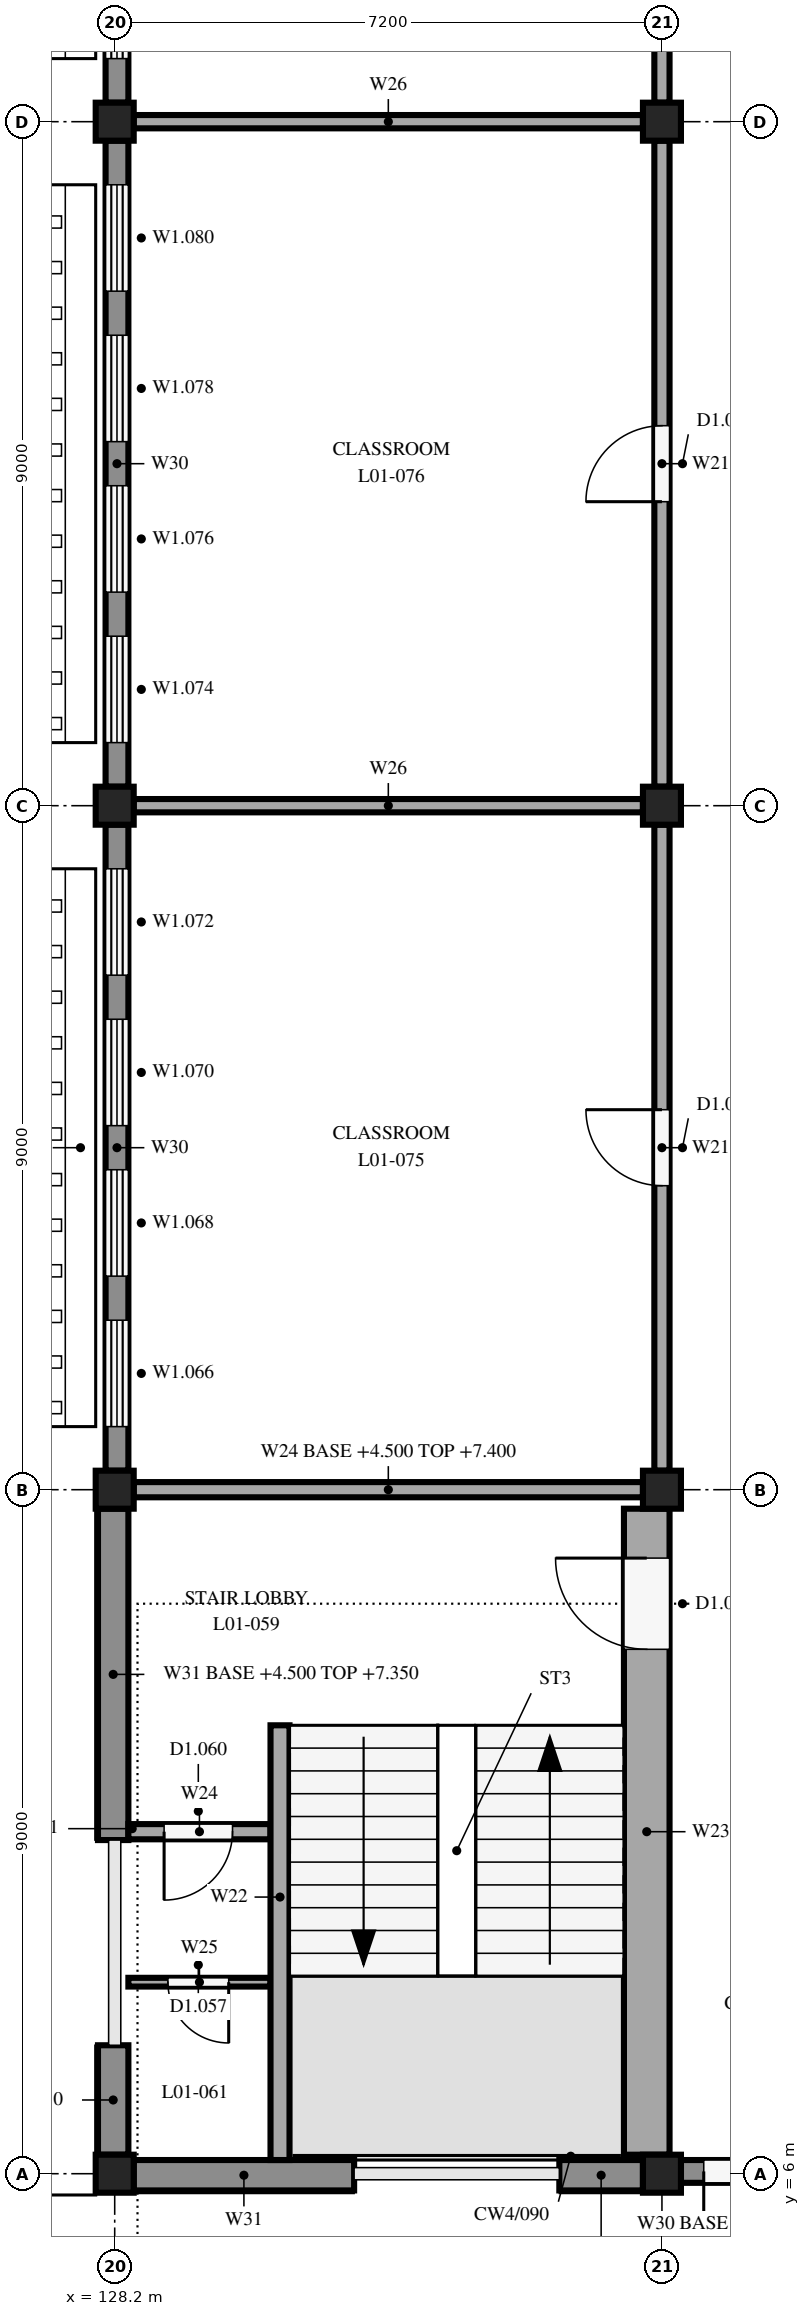
"""IFC4 building model, lengths in metres.
Left out: names, types, materials, properties, quantities, classifications, styles, units other than length and angle.
Written with IfcOpenShell. Run it as: python <this file> out.ifc"""

import sys

from ifc_helpers import new_model, si_unit, direction, frame, frame_2d, origin, origin_2d, place, context, subcontext, project, spatial, rectangle, extrude, element, fill, save


model = new_model("IFC4")
c1 = context("Model", 3, precision=1e-05, world=origin(), true_north=direction((0.0, 1.0)))
c2 = subcontext(c1, "Body", "Model", "MODEL_VIEW")
j1 = project(units=[si_unit("LENGTHUNIT", "METRE"), si_unit("PLANEANGLEUNIT", "RADIAN")], contexts=[c1])
p1 = place(None, origin())
s1 = spatial("IfcSite", under=j1, at=p1, CompositionType="ELEMENT")
p2 = place(p1, origin())
s2 = spatial("IfcBuilding", under=s1, at=p2, CompositionType="ELEMENT")
p3 = place(p2, frame((0.0, 0.0, 4.5)))
s3 = spatial("IfcBuildingStorey", under=s2, at=p3, CompositionType="ELEMENT", Elevation=4.5)
for number, where, z_axis, x_axis in (
    (1, (128.2, 6.0, 0.0), (0.0, 0.0, 1.0), (1.0, 0.0, 0.0)),
    (2, (128.2, 15.0, 0.0), (0.0, 0.0, 1.0), (1.0, 0.0, 0.0)),
    (3, (128.2, 24.0, 0.0), (0.0, 0.0, 1.0), (1.0, 0.0, 0.0)),
    (4, (128.2, 33.0, 0.0), (0.0, 0.0, 1.0), (1.0, 0.0, 0.0)),
    (5, (135.4, 6.0, 0.0), (0.0, 0.0, 1.0), (1.0, 0.0, 0.0)),
    (6, (135.4, 15.0, 0.0), (0.0, 0.0, 1.0), (1.0, 0.0, 0.0)),
    (7, (135.4, 24.0, 0.0), (0.0, 0.0, 1.0), (1.0, 0.0, 0.0)),
    (8, (135.4, 33.0, 0.0), (0.0, 0.0, 1.0), (1.0, 0.0, 0.0)),
):
    element("IfcColumn", number, at=place(p3, frame(where, z_axis=z_axis, x_axis=x_axis)), inside=s3, PredefinedType="COLUMN", context=c2, shape_type="SweptSolid", body=[
        extrude(rectangle(XDim=0.5, YDim=0.5, at=origin_2d()), origin(), (0.0, 0.0, 1.0), 3.35),
    ])
p4 = place(p3, frame((128.18, 6.25, 0.0), z_axis=(0.0, 0.0, 1.0), x_axis=(0.0, 1.0, 0.0)))
e9 = element("IfcWall", 9, at=p4, inside=s3, PredefinedType="STANDARD", context=c2, shape_type="SweptSolid", body=[
    extrude(rectangle(XDim=1.44, YDim=0.4, at=frame_2d((0.72, 0.0))), origin(), (0.0, 0.0, 1.0), 2.85),
])
p5 = place(p3, frame((128.18, 10.39, 0.0), z_axis=(0.0, 0.0, 1.0), x_axis=(0.0, 1.0, 0.0)))
e10 = element("IfcWall", 10, at=p5, inside=s3, PredefinedType="STANDARD", context=c2, shape_type="SweptSolid", body=[
    extrude(rectangle(XDim=4.36, YDim=0.4, at=frame_2d((2.18, 0.0))), origin(), (0.0, 0.0, 1.0), 2.85),
])
p6 = place(p3, frame((128.23, 15.25, 0.0), z_axis=(0.0, 0.0, 1.0), x_axis=(0.0, 1.0, 0.0)))
e11 = element("IfcWall", 11, at=p6, inside=s3, PredefinedType="STANDARD", context=c2, shape_type="SweptSolid", body=[
    extrude(rectangle(XDim=8.5, YDim=0.3, at=frame_2d((4.25, 0.0))), origin(), (0.0, 0.0, 1.0), 2.85),
])
p7 = place(p6, frame((0.58, 0.0, 0.6)))
e12 = element("IfcOpeningElement", 12, at=p7, cuts=e11, PredefinedType="OPENING", context=c2, shape_type="SweptSolid", body=[
    extrude(rectangle(XDim=1.4, YDim=2.2, at=frame_2d((0.7, 1.1))), frame((0.0, 0.16, 0.0), z_axis=(0.0, -1.0, 0.0), x_axis=(1.0, 0.0, 0.0)), (0.0, 0.0, 1.0), 0.32),
])
p8 = place(p6, frame((2.56, 0.0, 0.6)))
e13 = element("IfcOpeningElement", 13, at=p8, cuts=e11, PredefinedType="OPENING", context=c2, shape_type="SweptSolid", body=[
    extrude(rectangle(XDim=1.4, YDim=2.2, at=frame_2d((0.7, 1.1))), frame((0.0, 0.16, 0.0), z_axis=(0.0, -1.0, 0.0), x_axis=(1.0, 0.0, 0.0)), (0.0, 0.0, 1.0), 0.32),
])
p9 = place(p6, frame((4.54, 0.0, 0.6)))
e14 = element("IfcOpeningElement", 14, at=p9, cuts=e11, PredefinedType="OPENING", context=c2, shape_type="SweptSolid", body=[
    extrude(rectangle(XDim=1.4, YDim=2.2, at=frame_2d((0.7, 1.1))), frame((0.0, 0.16, 0.0), z_axis=(0.0, -1.0, 0.0), x_axis=(1.0, 0.0, 0.0)), (0.0, 0.0, 1.0), 0.32),
])
p10 = place(p6, frame((6.52, 0.0, 0.6)))
e15 = element("IfcOpeningElement", 15, at=p10, cuts=e11, PredefinedType="OPENING", context=c2, shape_type="SweptSolid", body=[
    extrude(rectangle(XDim=1.4, YDim=2.2, at=frame_2d((0.7, 1.1))), frame((0.0, 0.16, 0.0), z_axis=(0.0, -1.0, 0.0), x_axis=(1.0, 0.0, 0.0)), (0.0, 0.0, 1.0), 0.32),
])
p11 = place(p3, frame((128.23, 24.25, 0.0), z_axis=(0.0, 0.0, 1.0), x_axis=(0.0, 1.0, 0.0)))
e16 = element("IfcWall", 16, at=p11, inside=s3, PredefinedType="STANDARD", context=c2, shape_type="SweptSolid", body=[
    extrude(rectangle(XDim=8.5, YDim=0.3, at=frame_2d((4.25, 0.0))), origin(), (0.0, 0.0, 1.0), 2.85),
])
p12 = place(p11, frame((0.58, 0.0, 0.6)))
e17 = element("IfcOpeningElement", 17, at=p12, cuts=e16, PredefinedType="OPENING", context=c2, shape_type="SweptSolid", body=[
    extrude(rectangle(XDim=1.4, YDim=2.2, at=frame_2d((0.7, 1.1))), frame((0.0, 0.16, 0.0), z_axis=(0.0, -1.0, 0.0), x_axis=(1.0, 0.0, 0.0)), (0.0, 0.0, 1.0), 0.32),
])
p13 = place(p11, frame((2.56, 0.0, 0.6)))
e18 = element("IfcOpeningElement", 18, at=p13, cuts=e16, PredefinedType="OPENING", context=c2, shape_type="SweptSolid", body=[
    extrude(rectangle(XDim=1.4, YDim=2.2, at=frame_2d((0.7, 1.1))), frame((0.0, 0.16, 0.0), z_axis=(0.0, -1.0, 0.0), x_axis=(1.0, 0.0, 0.0)), (0.0, 0.0, 1.0), 0.32),
])
p14 = place(p11, frame((4.54, 0.0, 0.6)))
e19 = element("IfcOpeningElement", 19, at=p14, cuts=e16, PredefinedType="OPENING", context=c2, shape_type="SweptSolid", body=[
    extrude(rectangle(XDim=1.4, YDim=2.2, at=frame_2d((0.7, 1.1))), frame((0.0, 0.16, 0.0), z_axis=(0.0, -1.0, 0.0), x_axis=(1.0, 0.0, 0.0)), (0.0, 0.0, 1.0), 0.32),
])
p15 = place(p11, frame((6.52, 0.0, 0.6)))
e20 = element("IfcOpeningElement", 20, at=p15, cuts=e16, PredefinedType="OPENING", context=c2, shape_type="SweptSolid", body=[
    extrude(rectangle(XDim=1.4, YDim=2.2, at=frame_2d((0.7, 1.1))), frame((0.0, 0.16, 0.0), z_axis=(0.0, -1.0, 0.0), x_axis=(1.0, 0.0, 0.0)), (0.0, 0.0, 1.0), 0.32),
])
p16 = place(p3, frame((128.23, 33.25, 0.0), z_axis=(0.0, 0.0, 1.0), x_axis=(0.0, 1.0, 0.0)))
e21 = element("IfcWall", 21, at=p16, inside=s3, PredefinedType="STANDARD", context=c2, shape_type="SweptSolid", body=[
    extrude(rectangle(XDim=8.5, YDim=0.3, at=frame_2d((4.25, 0.0))), origin(), (0.0, 0.0, 1.0), 2.85),
])
p17 = place(p16, frame((0.58, 0.0, 0.6)))
e22 = element("IfcOpeningElement", 22, at=p17, cuts=e21, PredefinedType="OPENING", context=c2, shape_type="SweptSolid", body=[
    extrude(rectangle(XDim=1.4, YDim=2.2, at=frame_2d((0.7, 1.1))), frame((0.0, 0.16, 0.0), z_axis=(0.0, -1.0, 0.0), x_axis=(1.0, 0.0, 0.0)), (0.0, 0.0, 1.0), 0.32),
])
p18 = place(p16, frame((2.56, 0.0, 0.6)))
e23 = element("IfcOpeningElement", 23, at=p18, cuts=e21, PredefinedType="OPENING", context=c2, shape_type="SweptSolid", body=[
    extrude(rectangle(XDim=1.4, YDim=2.2, at=frame_2d((0.7, 1.1))), frame((0.0, 0.16, 0.0), z_axis=(0.0, -1.0, 0.0), x_axis=(1.0, 0.0, 0.0)), (0.0, 0.0, 1.0), 0.32),
])
p19 = place(p16, frame((4.54, 0.0, 0.6)))
e24 = element("IfcOpeningElement", 24, at=p19, cuts=e21, PredefinedType="OPENING", context=c2, shape_type="SweptSolid", body=[
    extrude(rectangle(XDim=1.4, YDim=2.2, at=frame_2d((0.7, 1.1))), frame((0.0, 0.16, 0.0), z_axis=(0.0, -1.0, 0.0), x_axis=(1.0, 0.0, 0.0)), (0.0, 0.0, 1.0), 0.32),
])
p20 = place(p16, frame((6.52, 0.0, 0.6)))
e25 = element("IfcOpeningElement", 25, at=p20, cuts=e21, PredefinedType="OPENING", context=c2, shape_type="SweptSolid", body=[
    extrude(rectangle(XDim=1.4, YDim=2.2, at=frame_2d((0.7, 1.1))), frame((0.0, 0.16, 0.0), z_axis=(0.0, -1.0, 0.0), x_axis=(1.0, 0.0, 0.0)), (0.0, 0.0, 1.0), 0.32),
])
p21 = place(p3, frame((131.35, 5.98, 0.0), z_axis=(0.0, 0.0, 1.0), x_axis=(-1.0, 0.0, 0.0)))
e26 = element("IfcWall", 26, at=p21, inside=s3, PredefinedType="STANDARD", context=c2, shape_type="SweptSolid", body=[
    extrude(rectangle(XDim=2.9, YDim=0.4, at=frame_2d((1.45, 0.0))), origin(), (0.0, 0.0, 1.0), 2.9),
])
p22 = place(p3, frame((135.15, 5.98, 0.0), z_axis=(0.0, 0.0, 1.0), x_axis=(-1.0, 0.0, 0.0)))
e27 = element("IfcWall", 27, at=p22, inside=s3, PredefinedType="STANDARD", context=c2, shape_type="SweptSolid", body=[
    extrude(rectangle(XDim=1.1, YDim=0.4, at=frame_2d((0.55, 0.0))), origin(), (0.0, 0.0, 1.0), 2.9),
])
p23 = place(p3, frame((137.85, 6.03, 0.0), z_axis=(0.0, 0.0, 1.0), x_axis=(-1.0, 0.0, 0.0)))
e28 = element("IfcWall", 28, at=p23, inside=s3, PredefinedType="STANDARD", context=c2, shape_type="SweptSolid", body=[
    extrude(rectangle(XDim=2.2, YDim=0.3, at=frame_2d((1.1, 0.0))), origin(), (0.0, 0.0, 1.0), 3.0),
])
p24 = place(p23, frame((0.3, 0.0, 0.0)))
e29 = element("IfcOpeningElement", 29, at=p24, cuts=e28, PredefinedType="OPENING", context=c2, shape_type="SweptSolid", body=[
    extrude(rectangle(XDim=1.6, YDim=2.4, at=frame_2d((0.8, 1.2))), frame((0.0, 0.16, 0.0), z_axis=(0.0, -1.0, 0.0), x_axis=(1.0, 0.0, 0.0)), (0.0, 0.0, 1.0), 0.32),
])
p25 = place(p3, frame((130.375, 6.18, 0.0), z_axis=(0.0, 0.0, 1.0), x_axis=(0.0, 1.0, 0.0)))
e30 = element("IfcWall", 30, at=p25, inside=s3, PredefinedType="SOLIDWALL", context=c2, shape_type="SweptSolid", body=[
    extrude(rectangle(XDim=5.72, YDim=0.25, at=frame_2d((2.86, 0.0))), origin(), (0.0, 0.0, 1.0), 3.35),
])
p26 = place(p3, frame((135.2, 6.25, 0.0), z_axis=(0.0, 0.0, 1.0), x_axis=(0.0, 1.0, 0.0)))
e31 = element("IfcWall", 31, at=p26, inside=s3, PredefinedType="SOLIDWALL", context=c2, shape_type="SweptSolid", body=[
    extrude(rectangle(XDim=8.5, YDim=0.6, at=frame_2d((4.25, 0.0))), origin(), (0.0, 0.0, 1.0), 3.35),
])
p27 = place(p26, frame((6.65, 0.0, 0.0)))
e32 = element("IfcOpeningElement", 32, at=p27, cuts=e31, PredefinedType="OPENING", context=c2, shape_type="SweptSolid", body=[
    extrude(rectangle(XDim=1.2, YDim=2.1, at=frame_2d((0.6, 1.05))), frame((0.0, 0.31, 0.0), z_axis=(0.0, -1.0, 0.0), x_axis=(1.0, 0.0, 0.0)), (0.0, 0.0, 1.0), 0.62),
])
p28 = place(p3, frame((130.25, 10.5, 0.0), z_axis=(0.0, 0.0, 1.0), x_axis=(-1.0, 0.0, 0.0)))
e33 = element("IfcWall", 33, at=p28, inside=s3, PredefinedType="SOLIDWALL", context=c2, shape_type="SweptSolid", body=[
    extrude(rectangle(XDim=1.87, YDim=0.2, at=frame_2d((0.935, 0.0))), origin(), (0.0, 0.0, 1.0), 3.35),
])
p29 = place(p28, frame((0.5, 0.0, 0.0)))
e34 = element("IfcOpeningElement", 34, at=p29, cuts=e33, PredefinedType="OPENING", context=c2, shape_type="SweptSolid", body=[
    extrude(rectangle(XDim=0.9, YDim=2.1, at=frame_2d((0.45, 1.05))), frame((0.0, 0.11, 0.0), z_axis=(0.0, -1.0, 0.0), x_axis=(1.0, 0.0, 0.0)), (0.0, 0.0, 1.0), 0.22),
])
p30 = place(p3, frame((130.25, 8.52, 0.0), z_axis=(0.0, 0.0, 1.0), x_axis=(-1.0, 0.0, 0.0)))
e35 = element("IfcWall", 35, at=p30, inside=s3, PredefinedType="PARTITIONING", context=c2, shape_type="SweptSolid", body=[
    extrude(rectangle(XDim=1.87, YDim=0.115, at=frame_2d((0.935, 0.0))), origin(), (0.0, 0.0, 1.0), 3.35),
])
p31 = place(p30, frame((0.55, 0.0, 0.0)))
e36 = element("IfcOpeningElement", 36, at=p31, cuts=e35, PredefinedType="OPENING", context=c2, shape_type="SweptSolid", body=[
    extrude(rectangle(XDim=0.8, YDim=2.1, at=frame_2d((0.4, 1.05))), frame((0.0, 0.067, 0.0), z_axis=(0.0, -1.0, 0.0), x_axis=(1.0, 0.0, 0.0)), (0.0, 0.0, 1.0), 0.135),
])
p32 = place(p3, frame((128.45, 15.0, 0.0), z_axis=(0.0, 0.0, 1.0), x_axis=(1.0, 0.0, 0.0)))
e37 = element("IfcWall", 37, at=p32, inside=s3, PredefinedType="SOLIDWALL", context=c2, shape_type="SweptSolid", body=[
    extrude(rectangle(XDim=6.7, YDim=0.2, at=frame_2d((3.35, 0.0))), origin(), (0.0, 0.0, 1.0), 2.9),
])
p33 = place(p3, frame((135.4, 15.25, 0.0), z_axis=(0.0, 0.0, 1.0), x_axis=(0.0, 1.0, 0.0)))
e38 = element("IfcWall", 38, at=p33, inside=s3, PredefinedType="PARTITIONING", context=c2, shape_type="SweptSolid", body=[
    extrude(rectangle(XDim=8.5, YDim=0.2, at=frame_2d((4.25, 0.0))), origin(), (0.0, 0.0, 1.0), 2.9),
])
p34 = place(p33, frame((3.75, 0.0, 0.0)))
e39 = element("IfcOpeningElement", 39, at=p34, cuts=e38, PredefinedType="OPENING", context=c2, shape_type="SweptSolid", body=[
    extrude(rectangle(XDim=1.0, YDim=2.1, at=frame_2d((0.5, 1.05))), frame((0.0, 0.11, 0.0), z_axis=(0.0, -1.0, 0.0), x_axis=(1.0, 0.0, 0.0)), (0.0, 0.0, 1.0), 0.22),
])
p35 = place(p3, frame((135.4, 24.25, 0.0), z_axis=(0.0, 0.0, 1.0), x_axis=(0.0, 1.0, 0.0)))
e40 = element("IfcWall", 40, at=p35, inside=s3, PredefinedType="PARTITIONING", context=c2, shape_type="SweptSolid", body=[
    extrude(rectangle(XDim=8.5, YDim=0.2, at=frame_2d((4.25, 0.0))), origin(), (0.0, 0.0, 1.0), 2.9),
])
p36 = place(p35, frame((3.75, 0.0, 0.0)))
e41 = element("IfcOpeningElement", 41, at=p36, cuts=e40, PredefinedType="OPENING", context=c2, shape_type="SweptSolid", body=[
    extrude(rectangle(XDim=1.0, YDim=2.1, at=frame_2d((0.5, 1.05))), frame((0.0, 0.11, 0.0), z_axis=(0.0, -1.0, 0.0), x_axis=(1.0, 0.0, 0.0)), (0.0, 0.0, 1.0), 0.22),
])
p37 = place(p3, frame((135.4, 33.25, 0.0), z_axis=(0.0, 0.0, 1.0), x_axis=(0.0, 1.0, 0.0)))
e42 = element("IfcWall", 42, at=p37, inside=s3, PredefinedType="PARTITIONING", context=c2, shape_type="SweptSolid", body=[
    extrude(rectangle(XDim=8.5, YDim=0.2, at=frame_2d((4.25, 0.0))), origin(), (0.0, 0.0, 1.0), 2.9),
])
p38 = place(p37, frame((3.75, 0.0, 0.0)))
e43 = element("IfcOpeningElement", 43, at=p38, cuts=e42, PredefinedType="OPENING", context=c2, shape_type="SweptSolid", body=[
    extrude(rectangle(XDim=1.0, YDim=2.1, at=frame_2d((0.5, 1.05))), frame((0.0, 0.11, 0.0), z_axis=(0.0, -1.0, 0.0), x_axis=(1.0, 0.0, 0.0)), (0.0, 0.0, 1.0), 0.22),
])
for number, where, z_axis, x_axis in (
    (44, (128.45, 24.0, 0.0), (0.0, 0.0, 1.0), (1.0, 0.0, 0.0)),
    (45, (128.45, 33.0, 0.0), (0.0, 0.0, 1.0), (1.0, 0.0, 0.0)),
):
    element("IfcWall", number, at=place(p3, frame(where, z_axis=z_axis, x_axis=x_axis)), inside=s3, PredefinedType="PARTITIONING", context=c2, shape_type="SweptSolid", body=[
        extrude(rectangle(XDim=6.7, YDim=0.175, at=frame_2d((3.35, 0.0))), origin(), (0.0, 0.0, 1.0), 2.9),
    ])
p39 = place(p7, origin())
e46 = element("IfcWindow", 46, at=p39, inside=s3, PartitioningType="DOUBLE_PANEL_VERTICAL", PredefinedType="WINDOW", context=c2, shape_type="SweptSolid", body=[
    extrude(rectangle(XDim=1.4, YDim=2.2, at=frame_2d((0.7, 1.1))), frame((0.0, 0.03, 0.0), z_axis=(0.0, -1.0, 0.0), x_axis=(1.0, 0.0, 0.0)), (0.0, 0.0, 1.0), 0.06),
])
fill(e12, e46)
p40 = place(p8, origin())
e47 = element("IfcWindow", 47, at=p40, inside=s3, PartitioningType="DOUBLE_PANEL_VERTICAL", PredefinedType="WINDOW", context=c2, shape_type="SweptSolid", body=[
    extrude(rectangle(XDim=1.4, YDim=2.2, at=frame_2d((0.7, 1.1))), frame((0.0, 0.03, 0.0), z_axis=(0.0, -1.0, 0.0), x_axis=(1.0, 0.0, 0.0)), (0.0, 0.0, 1.0), 0.06),
])
fill(e13, e47)
p41 = place(p9, origin())
e48 = element("IfcWindow", 48, at=p41, inside=s3, PartitioningType="DOUBLE_PANEL_VERTICAL", PredefinedType="WINDOW", context=c2, shape_type="SweptSolid", body=[
    extrude(rectangle(XDim=1.4, YDim=2.2, at=frame_2d((0.7, 1.1))), frame((0.0, 0.03, 0.0), z_axis=(0.0, -1.0, 0.0), x_axis=(1.0, 0.0, 0.0)), (0.0, 0.0, 1.0), 0.06),
])
fill(e14, e48)
p42 = place(p10, origin())
e49 = element("IfcWindow", 49, at=p42, inside=s3, PartitioningType="DOUBLE_PANEL_VERTICAL", PredefinedType="WINDOW", context=c2, shape_type="SweptSolid", body=[
    extrude(rectangle(XDim=1.4, YDim=2.2, at=frame_2d((0.7, 1.1))), frame((0.0, 0.03, 0.0), z_axis=(0.0, -1.0, 0.0), x_axis=(1.0, 0.0, 0.0)), (0.0, 0.0, 1.0), 0.06),
])
fill(e15, e49)
p43 = place(p12, origin())
e50 = element("IfcWindow", 50, at=p43, inside=s3, PartitioningType="DOUBLE_PANEL_VERTICAL", PredefinedType="WINDOW", context=c2, shape_type="SweptSolid", body=[
    extrude(rectangle(XDim=1.4, YDim=2.2, at=frame_2d((0.7, 1.1))), frame((0.0, 0.03, 0.0), z_axis=(0.0, -1.0, 0.0), x_axis=(1.0, 0.0, 0.0)), (0.0, 0.0, 1.0), 0.06),
])
fill(e17, e50)
p44 = place(p13, origin())
e51 = element("IfcWindow", 51, at=p44, inside=s3, PartitioningType="DOUBLE_PANEL_VERTICAL", PredefinedType="WINDOW", context=c2, shape_type="SweptSolid", body=[
    extrude(rectangle(XDim=1.4, YDim=2.2, at=frame_2d((0.7, 1.1))), frame((0.0, 0.03, 0.0), z_axis=(0.0, -1.0, 0.0), x_axis=(1.0, 0.0, 0.0)), (0.0, 0.0, 1.0), 0.06),
])
fill(e18, e51)
p45 = place(p14, origin())
e52 = element("IfcWindow", 52, at=p45, inside=s3, PartitioningType="DOUBLE_PANEL_VERTICAL", PredefinedType="WINDOW", context=c2, shape_type="SweptSolid", body=[
    extrude(rectangle(XDim=1.4, YDim=2.2, at=frame_2d((0.7, 1.1))), frame((0.0, 0.03, 0.0), z_axis=(0.0, -1.0, 0.0), x_axis=(1.0, 0.0, 0.0)), (0.0, 0.0, 1.0), 0.06),
])
fill(e19, e52)
p46 = place(p15, origin())
e53 = element("IfcWindow", 53, at=p46, inside=s3, PartitioningType="DOUBLE_PANEL_VERTICAL", PredefinedType="WINDOW", context=c2, shape_type="SweptSolid", body=[
    extrude(rectangle(XDim=1.4, YDim=2.2, at=frame_2d((0.7, 1.1))), frame((0.0, 0.03, 0.0), z_axis=(0.0, -1.0, 0.0), x_axis=(1.0, 0.0, 0.0)), (0.0, 0.0, 1.0), 0.06),
])
fill(e20, e53)
p47 = place(p17, origin())
e54 = element("IfcWindow", 54, at=p47, inside=s3, PartitioningType="DOUBLE_PANEL_VERTICAL", PredefinedType="WINDOW", context=c2, shape_type="SweptSolid", body=[
    extrude(rectangle(XDim=1.4, YDim=2.2, at=frame_2d((0.7, 1.1))), frame((0.0, 0.03, 0.0), z_axis=(0.0, -1.0, 0.0), x_axis=(1.0, 0.0, 0.0)), (0.0, 0.0, 1.0), 0.06),
])
fill(e22, e54)
p48 = place(p24, origin())
e55 = element("IfcDoor", 55, at=p48, inside=s3, OperationType="DOUBLE_DOOR_SINGLE_SWING", PredefinedType="DOOR", context=c2, shape_type="SweptSolid", body=[
    extrude(rectangle(XDim=1.6, YDim=2.4, at=frame_2d((0.8, 1.2))), frame((0.0, 0.025, 0.0), z_axis=(0.0, -1.0, 0.0), x_axis=(1.0, 0.0, 0.0)), (0.0, 0.0, 1.0), 0.05),
])
fill(e29, e55)
p49 = place(p27, origin())
e56 = element("IfcDoor", 56, at=p49, inside=s3, OperationType="SINGLE_SWING_RIGHT", PredefinedType="DOOR", context=c2, shape_type="SweptSolid", body=[
    extrude(rectangle(XDim=1.2, YDim=2.1, at=frame_2d((0.6, 1.05))), frame((0.0, 0.025, 0.0), z_axis=(0.0, -1.0, 0.0), x_axis=(1.0, 0.0, 0.0)), (0.0, 0.0, 1.0), 0.05),
])
fill(e32, e56)
p50 = place(p29, origin())
e57 = element("IfcDoor", 57, at=p50, inside=s3, OperationType="SINGLE_SWING_RIGHT", PredefinedType="DOOR", context=c2, shape_type="SweptSolid", body=[
    extrude(rectangle(XDim=0.9, YDim=2.1, at=frame_2d((0.45, 1.05))), frame((0.0, 0.025, 0.0), z_axis=(0.0, -1.0, 0.0), x_axis=(1.0, 0.0, 0.0)), (0.0, 0.0, 1.0), 0.05),
])
fill(e34, e57)
p51 = place(p31, origin())
e58 = element("IfcDoor", 58, at=p51, inside=s3, OperationType="SINGLE_SWING_LEFT", PredefinedType="DOOR", context=c2, shape_type="SweptSolid", body=[
    extrude(rectangle(XDim=0.8, YDim=2.1, at=frame_2d((0.4, 1.05))), frame((0.0, 0.025, 0.0), z_axis=(0.0, -1.0, 0.0), x_axis=(1.0, 0.0, 0.0)), (0.0, 0.0, 1.0), 0.05),
])
fill(e36, e58)
p52 = place(p34, origin())
e59 = element("IfcDoor", 59, at=p52, inside=s3, OperationType="SINGLE_SWING_RIGHT", PredefinedType="DOOR", context=c2, shape_type="SweptSolid", body=[
    extrude(rectangle(XDim=1.0, YDim=2.1, at=frame_2d((0.5, 1.05))), frame((0.0, 0.025, 0.0), z_axis=(0.0, -1.0, 0.0), x_axis=(1.0, 0.0, 0.0)), (0.0, 0.0, 1.0), 0.05),
])
fill(e39, e59)
p53 = place(p36, origin())
e60 = element("IfcDoor", 60, at=p53, inside=s3, OperationType="SINGLE_SWING_LEFT", PredefinedType="DOOR", context=c2, shape_type="SweptSolid", body=[
    extrude(rectangle(XDim=1.0, YDim=2.1, at=frame_2d((0.5, 1.05))), frame((0.0, 0.025, 0.0), z_axis=(0.0, -1.0, 0.0), x_axis=(1.0, 0.0, 0.0)), (0.0, 0.0, 1.0), 0.05),
])
fill(e41, e60)
save(model, sys.argv[1])
